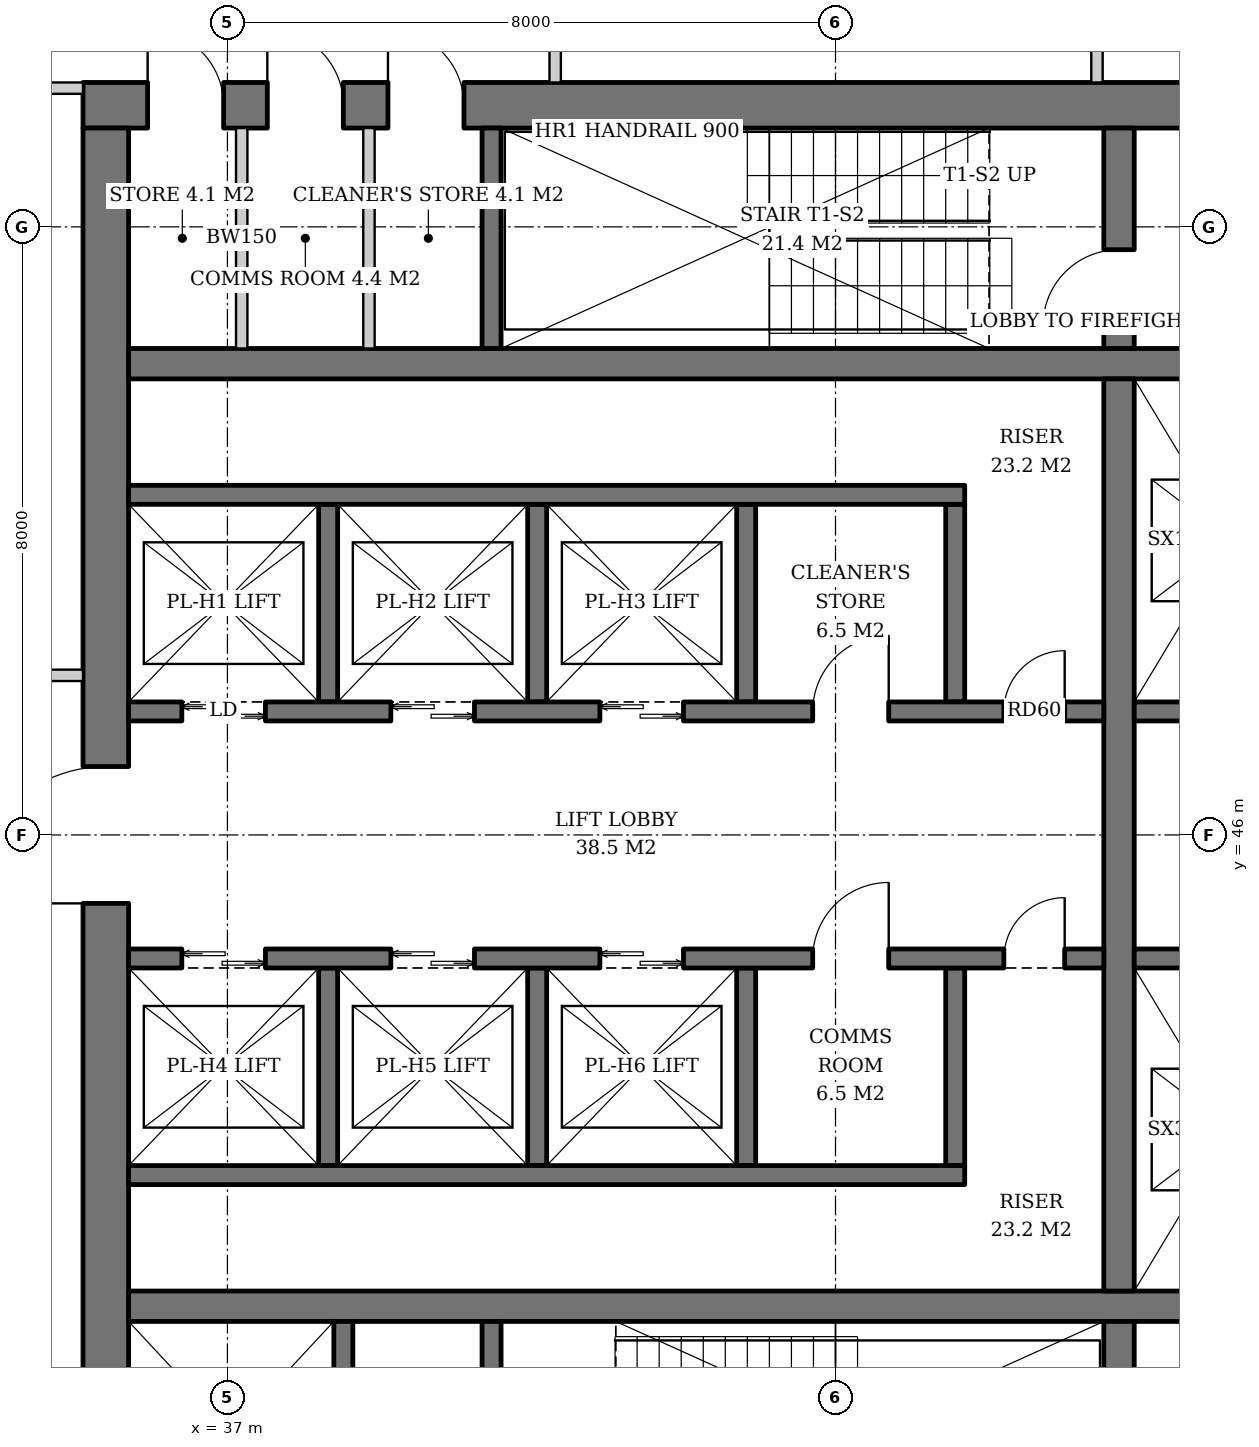
"""IFC4 building model, lengths in metres.
Left out: names, types, materials, properties, quantities, classifications, styles, units other than length and angle.
Written with IfcOpenShell. Run it as: python <this file> out.ifc"""

import sys

from ifc_helpers import new_model, si_unit, direction, frame, frame_2d, origin, place, context, subcontext, project, spatial, rectangle, extrude, element, fill, save


model = new_model("IFC4")
c1 = context("Model", 3, precision=1e-05, world=origin(), true_north=direction((0.0, 1.0)))
c2 = subcontext(c1, "Body", "Model", "MODEL_VIEW")
j1 = project(units=[si_unit("LENGTHUNIT", "METRE"), si_unit("PLANEANGLEUNIT", "RADIAN")], contexts=[c1])
p1 = place(None, origin())
s1 = spatial("IfcSite", under=j1, at=p1, CompositionType="ELEMENT")
p2 = place(p1, origin())
s2 = spatial("IfcBuilding", under=s1, at=p2, CompositionType="ELEMENT")
p3 = place(p2, frame((0.0, 0.0, 180.6)))
s3 = spatial("IfcBuildingStorey", under=s2, at=p3, CompositionType="ELEMENT", Elevation=180.6)
p4 = place(p3, frame((35.1, 55.6, 0.0), z_axis=(0.0, 0.0, 1.0), x_axis=(1.0, 0.0, 0.0)))
e1 = element("IfcWall", 1, at=p4, inside=s3, PredefinedType="SHEAR", context=c2, shape_type="SweptSolid", body=[
    extrude(rectangle(XDim=19.8, YDim=0.6, at=frame_2d((9.9, 0.0))), origin(), (0.0, 0.0, 1.0), 3.8),
])
p5 = place(p4, frame((14.54, 0.0, 0.0)))
e2 = element("IfcOpeningElement", 2, at=p5, cuts=e1, PredefinedType="OPENING", context=c2, shape_type="SweptSolid", body=[
    extrude(rectangle(XDim=1.0, YDim=2.1, at=frame_2d((0.5, 1.05))), frame((0.0, 0.31, 0.0), z_axis=(0.0, -1.0, 0.0), x_axis=(1.0, 0.0, 0.0)), (0.0, 0.0, 1.0), 0.62),
])
p6 = place(p4, frame((0.85, 0.0, 0.0)))
e3 = element("IfcOpeningElement", 3, at=p6, cuts=e1, PredefinedType="OPENING", context=c2, shape_type="SweptSolid", body=[
    extrude(rectangle(XDim=1.0, YDim=2.1, at=frame_2d((0.5, 1.05))), frame((0.0, 0.31, 0.0), z_axis=(0.0, -1.0, 0.0), x_axis=(1.0, 0.0, 0.0)), (0.0, 0.0, 1.0), 0.62),
])
p7 = place(p4, frame((2.425, 0.0, 0.0)))
e4 = element("IfcOpeningElement", 4, at=p7, cuts=e1, PredefinedType="OPENING", context=c2, shape_type="SweptSolid", body=[
    extrude(rectangle(XDim=1.0, YDim=2.1, at=frame_2d((0.5, 1.05))), frame((0.0, 0.31, 0.0), z_axis=(0.0, -1.0, 0.0), x_axis=(1.0, 0.0, 0.0)), (0.0, 0.0, 1.0), 0.62),
])
p8 = place(p4, frame((4.012, 0.0, 0.0)))
e5 = element("IfcOpeningElement", 5, at=p8, cuts=e1, PredefinedType="OPENING", context=c2, shape_type="SweptSolid", body=[
    extrude(rectangle(XDim=1.0, YDim=2.1, at=frame_2d((0.5, 1.05))), frame((0.0, 0.31, 0.0), z_axis=(0.0, -1.0, 0.0), x_axis=(1.0, 0.0, 0.0)), (0.0, 0.0, 1.0), 0.62),
])
p9 = place(p3, frame((35.4, 36.7, 0.0), z_axis=(0.0, 0.0, 1.0), x_axis=(0.0, 1.0, 0.0)))
e6 = element("IfcWall", 6, at=p9, inside=s3, PredefinedType="SHEAR", context=c2, shape_type="SweptSolid", body=[
    extrude(rectangle(XDim=18.6, YDim=0.6, at=frame_2d((9.3, 0.0))), origin(), (0.0, 0.0, 1.0), 3.8),
])
p10 = place(p9, frame((8.4, 0.0, 0.0)))
e7 = element("IfcOpeningElement", 7, at=p10, cuts=e6, PredefinedType="OPENING", context=c2, shape_type="SweptSolid", body=[
    extrude(rectangle(XDim=1.8, YDim=2.4, at=frame_2d((0.9, 1.2))), frame((0.0, 0.31, 0.0), z_axis=(0.0, -1.0, 0.0), x_axis=(1.0, 0.0, 0.0)), (0.0, 0.0, 1.0), 0.62),
])
for number, where, z_axis, x_axis in (
    (8, (35.7, 39.8, 0.0), (0.0, 0.0, 1.0), (1.0, 0.0, 0.0)),
    (9, (35.7, 52.2, 0.0), (0.0, 0.0, 1.0), (1.0, 0.0, 0.0)),
):
    element("IfcWall", number, at=place(p3, frame(where, z_axis=z_axis, x_axis=x_axis)), inside=s3, PredefinedType="SHEAR", context=c2, shape_type="SweptSolid", body=[
        extrude(rectangle(XDim=18.6, YDim=0.4, at=frame_2d((9.3, 0.0))), origin(), (0.0, 0.0, 1.0), 3.8),
    ])
p11 = place(p3, frame((48.73, 36.7, 0.0), z_axis=(0.0, 0.0, 1.0), x_axis=(0.0, 1.0, 0.0)))
e10 = element("IfcWall", 10, at=p11, inside=s3, PredefinedType="SHEAR", context=c2, shape_type="SweptSolid", body=[
    extrude(rectangle(XDim=2.9, YDim=0.4, at=frame_2d((1.45, 0.0))), origin(), (0.0, 0.0, 1.0), 3.8),
])
p12 = place(p3, frame((48.73, 40.0, 0.0), z_axis=(0.0, 0.0, 1.0), x_axis=(0.0, 1.0, 0.0)))
e11 = element("IfcWall", 11, at=p12, inside=s3, PredefinedType="SHEAR", context=c2, shape_type="SweptSolid", body=[
    extrude(rectangle(XDim=12.0, YDim=0.4, at=frame_2d((6.0, 0.0))), origin(), (0.0, 0.0, 1.0), 3.8),
])
p13 = place(p3, frame((48.73, 52.4, 0.0), z_axis=(0.0, 0.0, 1.0), x_axis=(0.0, 1.0, 0.0)))
e12 = element("IfcWall", 12, at=p13, inside=s3, PredefinedType="SHEAR", context=c2, shape_type="SweptSolid", body=[
    extrude(rectangle(XDim=2.9, YDim=0.4, at=frame_2d((1.45, 0.0))), origin(), (0.0, 0.0, 1.0), 3.8),
])
p14 = place(p13, frame((0.3, 0.0, 0.0)))
e13 = element("IfcOpeningElement", 13, at=p14, cuts=e12, PredefinedType="OPENING", context=c2, shape_type="SweptSolid", body=[
    extrude(rectangle(XDim=1.0, YDim=2.1, at=frame_2d((0.5, 1.05))), frame((0.0, 0.21, 0.0), z_axis=(0.0, -1.0, 0.0), x_axis=(1.0, 0.0, 0.0)), (0.0, 0.0, 1.0), 0.42),
])
p15 = place(p3, frame((38.525, 36.7, 0.0), z_axis=(0.0, 0.0, 1.0), x_axis=(0.0, 1.0, 0.0)))
e14 = element("IfcWall", 14, at=p15, inside=s3, PredefinedType="SHEAR", context=c2, shape_type="SweptSolid", body=[
    extrude(rectangle(XDim=2.9, YDim=0.25, at=frame_2d((1.45, 0.0))), origin(), (0.0, 0.0, 1.0), 3.8),
])
p16 = place(p15, frame((0.8, 0.0, 0.0)))
e15 = element("IfcOpeningElement", 15, at=p16, cuts=e14, PredefinedType="OPENING", context=c2, shape_type="SweptSolid", body=[
    extrude(rectangle(XDim=1.3, YDim=2.2, at=frame_2d((0.65, 1.1))), frame((0.0, 0.135, 0.0), z_axis=(0.0, -1.0, 0.0), x_axis=(1.0, 0.0, 0.0)), (0.0, 0.0, 1.0), 0.27),
])
p17 = place(p3, frame((40.475, 36.7, 0.0), z_axis=(0.0, 0.0, 1.0), x_axis=(0.0, 1.0, 0.0)))
e16 = element("IfcWall", 16, at=p17, inside=s3, PredefinedType="SHEAR", context=c2, shape_type="SweptSolid", body=[
    extrude(rectangle(XDim=2.9, YDim=0.25, at=frame_2d((1.45, 0.0))), origin(), (0.0, 0.0, 1.0), 3.8),
])
p18 = place(p17, frame((0.75, 0.0, 0.0)))
e17 = element("IfcOpeningElement", 17, at=p18, cuts=e16, PredefinedType="OPENING", context=c2, shape_type="SweptSolid", body=[
    extrude(rectangle(XDim=1.2, YDim=2.1, at=frame_2d((0.6, 1.05))), frame((0.0, 0.135, 0.0), z_axis=(0.0, -1.0, 0.0), x_axis=(1.0, 0.0, 0.0)), (0.0, 0.0, 1.0), 0.27),
])
p19 = place(p3, frame((40.475, 52.4, 0.0), z_axis=(0.0, 0.0, 1.0), x_axis=(0.0, 1.0, 0.0)))
e18 = element("IfcWall", 18, at=p19, inside=s3, PredefinedType="SHEAR", context=c2, shape_type="SweptSolid", body=[
    extrude(rectangle(XDim=2.9, YDim=0.25, at=frame_2d((1.45, 0.0))), origin(), (0.0, 0.0, 1.0), 3.8),
])
for number, where, z_axis, x_axis in (
    (19, (38.325, 47.75, 0.0), (0.0, 0.0, 1.0), (0.0, 1.0, 0.0)),
    (20, (41.075, 47.75, 0.0), (0.0, 0.0, 1.0), (0.0, 1.0, 0.0)),
    (21, (43.825, 47.75, 0.0), (0.0, 0.0, 1.0), (0.0, 1.0, 0.0)),
    (22, (46.575, 47.75, 0.0), (0.0, 0.0, 1.0), (0.0, 1.0, 0.0)),
):
    element("IfcWall", number, at=place(p3, frame(where, z_axis=z_axis, x_axis=x_axis)), inside=s3, PredefinedType="SHEAR", context=c2, shape_type="SweptSolid", body=[
        extrude(rectangle(XDim=2.6, YDim=0.25, at=frame_2d((1.3, 0.0))), origin(), (0.0, 0.0, 1.0), 3.8),
    ])
p20 = place(p3, frame((35.7, 50.475, 0.0), z_axis=(0.0, 0.0, 1.0), x_axis=(1.0, 0.0, 0.0)))
e23 = element("IfcWall", 23, at=p20, inside=s3, PredefinedType="SHEAR", context=c2, shape_type="SweptSolid", body=[
    extrude(rectangle(XDim=11.0, YDim=0.25, at=frame_2d((5.5, 0.0))), origin(), (0.0, 0.0, 1.0), 3.8),
])
p21 = place(p3, frame((35.7, 47.625, 0.0), z_axis=(0.0, 0.0, 1.0), x_axis=(1.0, 0.0, 0.0)))
e24 = element("IfcWall", 24, at=p21, inside=s3, PredefinedType="SHEAR", context=c2, shape_type="SweptSolid", body=[
    extrude(rectangle(XDim=12.83, YDim=0.25, at=frame_2d((6.415, 0.0))), origin(), (0.0, 0.0, 1.0), 3.8),
])
p22 = place(p21, frame((0.7, 0.0, 0.0)))
e25 = element("IfcOpeningElement", 25, at=p22, cuts=e24, PredefinedType="OPENING", context=c2, shape_type="SweptSolid", body=[
    extrude(rectangle(XDim=1.1, YDim=2.2, at=frame_2d((0.55, 1.1))), frame((0.0, 0.135, 0.0), z_axis=(0.0, -1.0, 0.0), x_axis=(1.0, 0.0, 0.0)), (0.0, 0.0, 1.0), 0.27),
])
p23 = place(p21, frame((3.45, 0.0, 0.0)))
e26 = element("IfcOpeningElement", 26, at=p23, cuts=e24, PredefinedType="OPENING", context=c2, shape_type="SweptSolid", body=[
    extrude(rectangle(XDim=1.1, YDim=2.2, at=frame_2d((0.55, 1.1))), frame((0.0, 0.135, 0.0), z_axis=(0.0, -1.0, 0.0), x_axis=(1.0, 0.0, 0.0)), (0.0, 0.0, 1.0), 0.27),
])
p24 = place(p21, frame((6.2, 0.0, 0.0)))
e27 = element("IfcOpeningElement", 27, at=p24, cuts=e24, PredefinedType="OPENING", context=c2, shape_type="SweptSolid", body=[
    extrude(rectangle(XDim=1.1, YDim=2.2, at=frame_2d((0.55, 1.1))), frame((0.0, 0.135, 0.0), z_axis=(0.0, -1.0, 0.0), x_axis=(1.0, 0.0, 0.0)), (0.0, 0.0, 1.0), 0.27),
])
p25 = place(p21, frame((9.0, 0.0, 0.0)))
e28 = element("IfcOpeningElement", 28, at=p25, cuts=e24, PredefinedType="OPENING", context=c2, shape_type="SweptSolid", body=[
    extrude(rectangle(XDim=1.0, YDim=2.1, at=frame_2d((0.5, 1.05))), frame((0.0, 0.135, 0.0), z_axis=(0.0, -1.0, 0.0), x_axis=(1.0, 0.0, 0.0)), (0.0, 0.0, 1.0), 0.27),
])
p26 = place(p21, frame((11.515, 0.0, 0.0)))
e29 = element("IfcOpeningElement", 29, at=p26, cuts=e24, PredefinedType="OPENING", context=c2, shape_type="SweptSolid", body=[
    extrude(rectangle(XDim=0.8, YDim=2.0, at=frame_2d((0.4, 1.0))), frame((0.0, 0.135, 0.0), z_axis=(0.0, -1.0, 0.0), x_axis=(1.0, 0.0, 0.0)), (0.0, 0.0, 1.0), 0.27),
])
for number, where, z_axis, x_axis in (
    (30, (38.325, 44.25, 0.0), (0.0, 0.0, 1.0), (0.0, -1.0, 0.0)),
    (31, (41.075, 44.25, 0.0), (0.0, 0.0, 1.0), (0.0, -1.0, 0.0)),
    (32, (43.825, 44.25, 0.0), (0.0, 0.0, 1.0), (0.0, -1.0, 0.0)),
    (33, (46.575, 44.25, 0.0), (0.0, 0.0, 1.0), (0.0, -1.0, 0.0)),
):
    element("IfcWall", number, at=place(p3, frame(where, z_axis=z_axis, x_axis=x_axis)), inside=s3, PredefinedType="SHEAR", context=c2, shape_type="SweptSolid", body=[
        extrude(rectangle(XDim=2.6, YDim=0.25, at=frame_2d((1.3, 0.0))), origin(), (0.0, 0.0, 1.0), 3.8),
    ])
p27 = place(p3, frame((35.7, 41.525, 0.0), z_axis=(0.0, 0.0, 1.0), x_axis=(1.0, 0.0, 0.0)))
e34 = element("IfcWall", 34, at=p27, inside=s3, PredefinedType="SHEAR", context=c2, shape_type="SweptSolid", body=[
    extrude(rectangle(XDim=11.0, YDim=0.25, at=frame_2d((5.5, 0.0))), origin(), (0.0, 0.0, 1.0), 3.8),
])
p28 = place(p3, frame((35.7, 44.375, 0.0), z_axis=(0.0, 0.0, 1.0), x_axis=(1.0, 0.0, 0.0)))
e35 = element("IfcWall", 35, at=p28, inside=s3, PredefinedType="SHEAR", context=c2, shape_type="SweptSolid", body=[
    extrude(rectangle(XDim=12.83, YDim=0.25, at=frame_2d((6.415, 0.0))), origin(), (0.0, 0.0, 1.0), 3.8),
])
p29 = place(p28, frame((0.7, 0.0, 0.0)))
e36 = element("IfcOpeningElement", 36, at=p29, cuts=e35, PredefinedType="OPENING", context=c2, shape_type="SweptSolid", body=[
    extrude(rectangle(XDim=1.1, YDim=2.2, at=frame_2d((0.55, 1.1))), frame((0.0, 0.135, 0.0), z_axis=(0.0, -1.0, 0.0), x_axis=(1.0, 0.0, 0.0)), (0.0, 0.0, 1.0), 0.27),
])
p30 = place(p28, frame((3.45, 0.0, 0.0)))
e37 = element("IfcOpeningElement", 37, at=p30, cuts=e35, PredefinedType="OPENING", context=c2, shape_type="SweptSolid", body=[
    extrude(rectangle(XDim=1.1, YDim=2.2, at=frame_2d((0.55, 1.1))), frame((0.0, 0.135, 0.0), z_axis=(0.0, -1.0, 0.0), x_axis=(1.0, 0.0, 0.0)), (0.0, 0.0, 1.0), 0.27),
])
p31 = place(p28, frame((6.2, 0.0, 0.0)))
e38 = element("IfcOpeningElement", 38, at=p31, cuts=e35, PredefinedType="OPENING", context=c2, shape_type="SweptSolid", body=[
    extrude(rectangle(XDim=1.1, YDim=2.2, at=frame_2d((0.55, 1.1))), frame((0.0, 0.135, 0.0), z_axis=(0.0, -1.0, 0.0), x_axis=(1.0, 0.0, 0.0)), (0.0, 0.0, 1.0), 0.27),
])
p32 = place(p28, frame((9.0, 0.0, 0.0)))
e39 = element("IfcOpeningElement", 39, at=p32, cuts=e35, PredefinedType="OPENING", context=c2, shape_type="SweptSolid", body=[
    extrude(rectangle(XDim=1.0, YDim=2.1, at=frame_2d((0.5, 1.05))), frame((0.0, 0.135, 0.0), z_axis=(0.0, -1.0, 0.0), x_axis=(1.0, 0.0, 0.0)), (0.0, 0.0, 1.0), 0.27),
])
p33 = place(p28, frame((11.515, 0.0, 0.0)))
e40 = element("IfcOpeningElement", 40, at=p33, cuts=e35, PredefinedType="OPENING", context=c2, shape_type="SweptSolid", body=[
    extrude(rectangle(XDim=0.8, YDim=2.0, at=frame_2d((0.4, 1.0))), frame((0.0, 0.135, 0.0), z_axis=(0.0, -1.0, 0.0), x_axis=(1.0, 0.0, 0.0)), (0.0, 0.0, 1.0), 0.27),
])
for number, where, z_axis, x_axis in (
    (41, (48.93, 47.625, 0.0), (0.0, 0.0, 1.0), (1.0, 0.0, 0.0)),
    (42, (48.93, 44.375, 0.0), (0.0, 0.0, 1.0), (1.0, 0.0, 0.0)),
):
    element("IfcWall", number, at=place(p3, frame(where, z_axis=z_axis, x_axis=x_axis)), inside=s3, PredefinedType="SHEAR", context=c2, shape_type="SweptSolid", body=[
        extrude(rectangle(XDim=5.37, YDim=0.25, at=frame_2d((2.685, 0.0))), origin(), (0.0, 0.0, 1.0), 3.8),
    ])
for number, where, z_axis, x_axis in (
    (43, (37.188, 52.4, 0.0), (0.0, 0.0, 1.0), (0.0, 1.0, 0.0)),
    (44, (38.862, 52.4, 0.0), (0.0, 0.0, 1.0), (0.0, 1.0, 0.0)),
):
    element("IfcWall", number, at=place(p3, frame(where, z_axis=z_axis, x_axis=x_axis)), inside=s3, PredefinedType="SOLIDWALL", context=c2, shape_type="SweptSolid", body=[
        extrude(rectangle(XDim=2.9, YDim=0.15, at=frame_2d((1.45, 0.0))), origin(), (0.0, 0.0, 1.0), 3.62),
    ])
for number, where, z_axis, x_axis in (
    (45, (48.44, 55.9, 0.0), (0.0, 0.0, 1.0), (0.0, 1.0, 0.0)),
    (46, (41.312, 55.9, 0.0), (0.0, 0.0, 1.0), (0.0, 1.0, 0.0)),
):
    element("IfcWall", number, at=place(p3, frame(where, z_axis=z_axis, x_axis=x_axis)), inside=s3, PredefinedType="PARTITIONING", context=c2, shape_type="SweptSolid", body=[
        extrude(rectangle(XDim=2.325, YDim=0.15, at=frame_2d((1.163, 0.0))), origin(), (0.0, 0.0, 1.0), 3.62),
    ])
p34 = place(p3, frame((35.1, 55.825, 0.0), z_axis=(0.0, 0.0, 1.0), x_axis=(-1.0, 0.0, 0.0)))
e47 = element("IfcWall", 47, at=p34, inside=s3, PredefinedType="PARTITIONING", context=c2, shape_type="SweptSolid", body=[
    extrude(rectangle(XDim=2.325, YDim=0.15, at=frame_2d((1.163, 0.0))), origin(), (0.0, 0.0, 1.0), 2.867),
])
p35 = place(p3, frame((35.1, 48.1, 0.0), z_axis=(0.0, 0.0, 1.0), x_axis=(-1.0, 0.0, 0.0)))
e48 = element("IfcWall", 48, at=p35, inside=s3, PredefinedType="PARTITIONING", context=c2, shape_type="SweptSolid", body=[
    extrude(rectangle(XDim=2.325, YDim=0.15, at=frame_2d((1.163, 0.0))), origin(), (0.0, 0.0, 1.0), 3.62),
])
p36 = place(p22, origin())
e49 = element("IfcDoor", 49, at=p36, inside=s3, OperationType="DOUBLE_DOOR_SLIDING", PredefinedType="DOOR", context=c2, shape_type="SweptSolid", body=[
    extrude(rectangle(XDim=1.1, YDim=2.2, at=frame_2d((0.55, 1.1))), frame((0.0, 0.025, 0.0), z_axis=(0.0, -1.0, 0.0), x_axis=(1.0, 0.0, 0.0)), (0.0, 0.0, 1.0), 0.05),
])
fill(e25, e49)
p37 = place(p23, origin())
e50 = element("IfcDoor", 50, at=p37, inside=s3, OperationType="DOUBLE_DOOR_SLIDING", PredefinedType="DOOR", context=c2, shape_type="SweptSolid", body=[
    extrude(rectangle(XDim=1.1, YDim=2.2, at=frame_2d((0.55, 1.1))), frame((0.0, 0.025, 0.0), z_axis=(0.0, -1.0, 0.0), x_axis=(1.0, 0.0, 0.0)), (0.0, 0.0, 1.0), 0.05),
])
fill(e26, e50)
p38 = place(p24, origin())
e51 = element("IfcDoor", 51, at=p38, inside=s3, OperationType="DOUBLE_DOOR_SLIDING", PredefinedType="DOOR", context=c2, shape_type="SweptSolid", body=[
    extrude(rectangle(XDim=1.1, YDim=2.2, at=frame_2d((0.55, 1.1))), frame((0.0, 0.025, 0.0), z_axis=(0.0, -1.0, 0.0), x_axis=(1.0, 0.0, 0.0)), (0.0, 0.0, 1.0), 0.05),
])
fill(e27, e51)
p39 = place(p25, origin())
e52 = element("IfcDoor", 52, at=p39, inside=s3, OperationType="SINGLE_SWING_RIGHT", PredefinedType="DOOR", context=c2, shape_type="SweptSolid", body=[
    extrude(rectangle(XDim=1.0, YDim=2.1, at=frame_2d((0.5, 1.05))), frame((0.0, 0.025, 0.0), z_axis=(0.0, -1.0, 0.0), x_axis=(1.0, 0.0, 0.0)), (0.0, 0.0, 1.0), 0.05),
])
fill(e28, e52)
p40 = place(p26, origin())
e53 = element("IfcDoor", 53, at=p40, inside=s3, OperationType="SINGLE_SWING_RIGHT", PredefinedType="DOOR", context=c2, shape_type="SweptSolid", body=[
    extrude(rectangle(XDim=0.8, YDim=2.0, at=frame_2d((0.4, 1.0))), frame((0.0, 0.025, 0.0), z_axis=(0.0, -1.0, 0.0), x_axis=(1.0, 0.0, 0.0)), (0.0, 0.0, 1.0), 0.05),
])
fill(e29, e53)
p41 = place(p29, origin())
e54 = element("IfcDoor", 54, at=p41, inside=s3, OperationType="DOUBLE_DOOR_SLIDING", PredefinedType="DOOR", context=c2, shape_type="SweptSolid", body=[
    extrude(rectangle(XDim=1.1, YDim=2.2, at=frame_2d((0.55, 1.1))), frame((0.0, 0.025, 0.0), z_axis=(0.0, -1.0, 0.0), x_axis=(1.0, 0.0, 0.0)), (0.0, 0.0, 1.0), 0.05),
])
fill(e36, e54)
p42 = place(p30, origin())
e55 = element("IfcDoor", 55, at=p42, inside=s3, OperationType="DOUBLE_DOOR_SLIDING", PredefinedType="DOOR", context=c2, shape_type="SweptSolid", body=[
    extrude(rectangle(XDim=1.1, YDim=2.2, at=frame_2d((0.55, 1.1))), frame((0.0, 0.025, 0.0), z_axis=(0.0, -1.0, 0.0), x_axis=(1.0, 0.0, 0.0)), (0.0, 0.0, 1.0), 0.05),
])
fill(e37, e55)
p43 = place(p31, origin())
e56 = element("IfcDoor", 56, at=p43, inside=s3, OperationType="DOUBLE_DOOR_SLIDING", PredefinedType="DOOR", context=c2, shape_type="SweptSolid", body=[
    extrude(rectangle(XDim=1.1, YDim=2.2, at=frame_2d((0.55, 1.1))), frame((0.0, 0.025, 0.0), z_axis=(0.0, -1.0, 0.0), x_axis=(1.0, 0.0, 0.0)), (0.0, 0.0, 1.0), 0.05),
])
fill(e38, e56)
p44 = place(p32, origin())
e57 = element("IfcDoor", 57, at=p44, inside=s3, OperationType="SINGLE_SWING_RIGHT", PredefinedType="DOOR", context=c2, shape_type="SweptSolid", body=[
    extrude(rectangle(XDim=1.0, YDim=2.1, at=frame_2d((0.5, 1.05))), frame((0.0, 0.025, 0.0), z_axis=(0.0, -1.0, 0.0), x_axis=(1.0, 0.0, 0.0)), (0.0, 0.0, 1.0), 0.05),
])
fill(e39, e57)
p45 = place(p33, origin())
e58 = element("IfcDoor", 58, at=p45, inside=s3, OperationType="SINGLE_SWING_RIGHT", PredefinedType="DOOR", context=c2, shape_type="SweptSolid", body=[
    extrude(rectangle(XDim=0.8, YDim=2.0, at=frame_2d((0.4, 1.0))), frame((0.0, 0.025, 0.0), z_axis=(0.0, -1.0, 0.0), x_axis=(1.0, 0.0, 0.0)), (0.0, 0.0, 1.0), 0.05),
])
fill(e40, e58)
p46 = place(p14, origin())
e59 = element("IfcDoor", 59, at=p46, inside=s3, OperationType="SINGLE_SWING_LEFT", PredefinedType="DOOR", context=c2, shape_type="SweptSolid", body=[
    extrude(rectangle(XDim=1.0, YDim=2.1, at=frame_2d((0.5, 1.05))), frame((0.0, 0.025, 0.0), z_axis=(0.0, -1.0, 0.0), x_axis=(1.0, 0.0, 0.0)), (0.0, 0.0, 1.0), 0.05),
])
fill(e13, e59)
p47 = place(p10, origin())
e60 = element("IfcDoor", 60, at=p47, inside=s3, OperationType="DOUBLE_DOOR_SINGLE_SWING", PredefinedType="DOOR", context=c2, shape_type="SweptSolid", body=[
    extrude(rectangle(XDim=1.8, YDim=2.4, at=frame_2d((0.9, 1.2))), frame((0.0, 0.025, 0.0), z_axis=(0.0, -1.0, 0.0), x_axis=(1.0, 0.0, 0.0)), (0.0, 0.0, 1.0), 0.05),
])
fill(e7, e60)
p48 = place(p6, origin())
e61 = element("IfcDoor", 61, at=p48, inside=s3, OperationType="SINGLE_SWING_LEFT", PredefinedType="DOOR", context=c2, shape_type="SweptSolid", body=[
    extrude(rectangle(XDim=1.0, YDim=2.1, at=frame_2d((0.5, 1.05))), frame((0.0, -0.24, 0.0), z_axis=(0.0, -1.0, 0.0), x_axis=(1.0, 0.0, 0.0)), (0.0, 0.0, 1.0), 0.05),
])
fill(e3, e61)
p49 = place(p7, origin())
e62 = element("IfcDoor", 62, at=p49, inside=s3, OperationType="SINGLE_SWING_LEFT", PredefinedType="DOOR", context=c2, shape_type="SweptSolid", body=[
    extrude(rectangle(XDim=1.0, YDim=2.1, at=frame_2d((0.5, 1.05))), frame((0.0, -0.24, 0.0), z_axis=(0.0, -1.0, 0.0), x_axis=(1.0, 0.0, 0.0)), (0.0, 0.0, 1.0), 0.05),
])
fill(e4, e62)
p50 = place(p8, origin())
e63 = element("IfcDoor", 63, at=p50, inside=s3, OperationType="SINGLE_SWING_LEFT", PredefinedType="DOOR", context=c2, shape_type="SweptSolid", body=[
    extrude(rectangle(XDim=1.0, YDim=2.1, at=frame_2d((0.5, 1.05))), frame((0.0, -0.24, 0.0), z_axis=(0.0, -1.0, 0.0), x_axis=(1.0, 0.0, 0.0)), (0.0, 0.0, 1.0), 0.05),
])
fill(e5, e63)
save(model, sys.argv[1])
